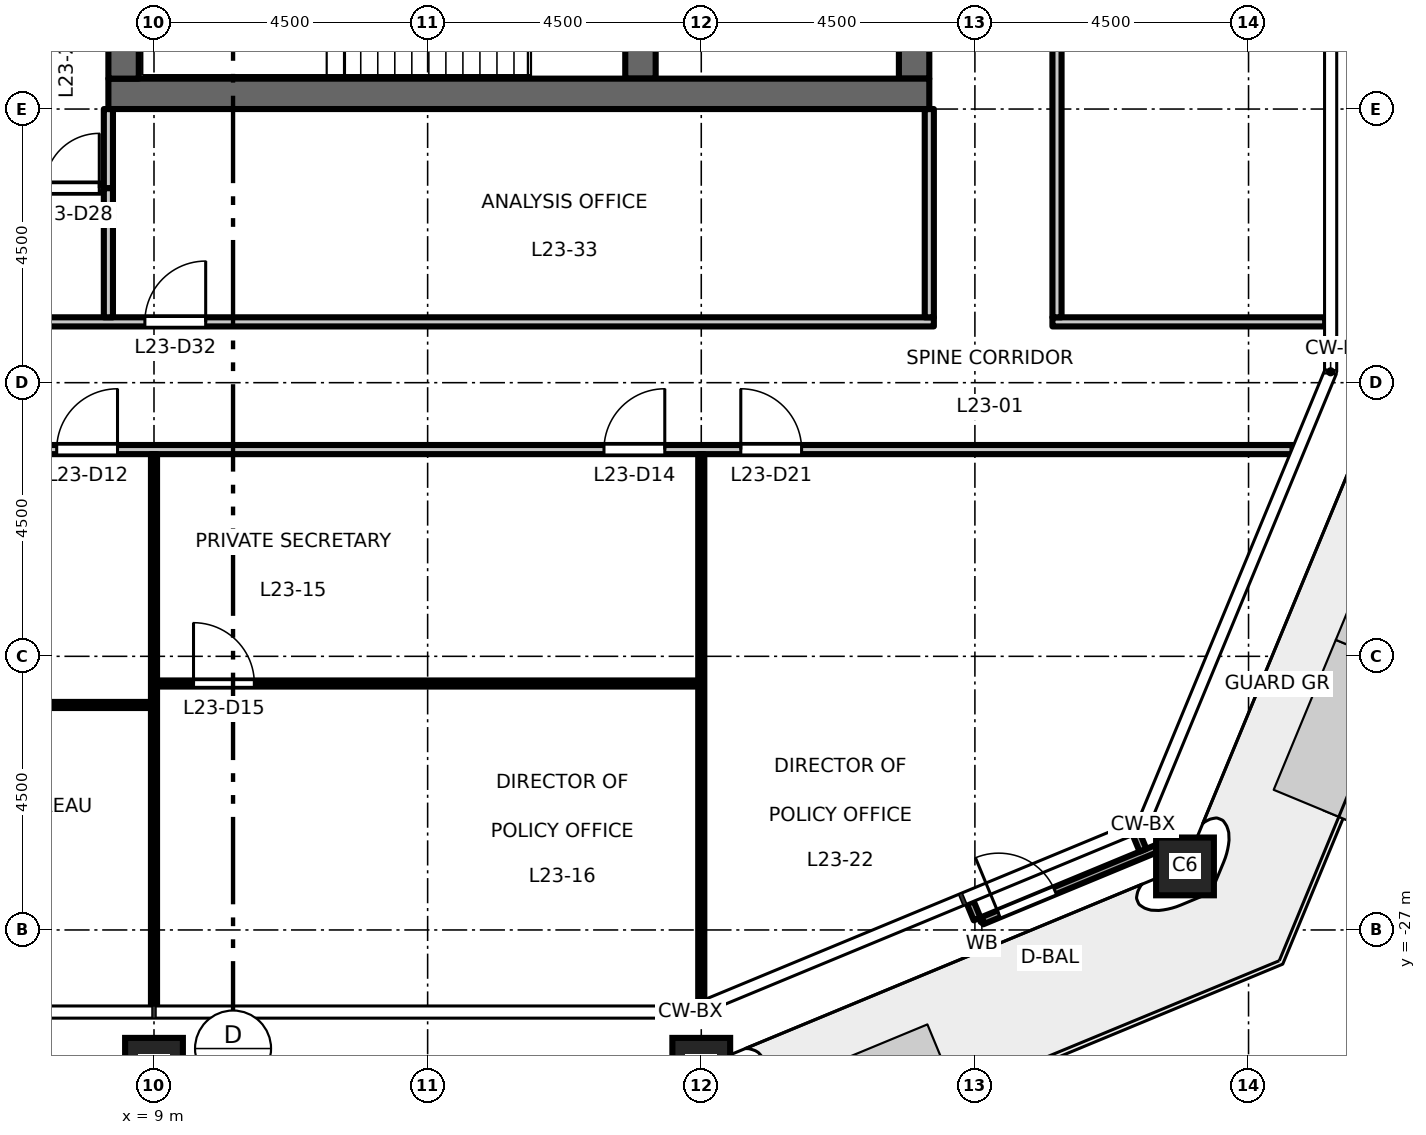
"""IFC4 building model, lengths in metres.
Left out: names, types, materials, properties, quantities, classifications, styles, units other than length and angle.
Written with IfcOpenShell. Run it as: python <this file> out.ifc"""

import sys

from ifc_helpers import new_model, si_unit, direction, frame, frame_2d, origin, origin_2d, place, context, subcontext, project, spatial, rectangle, hollow_rectangle, extrude, element, fill, save


model = new_model("IFC4")
c1 = context("Model", 3, precision=1e-05, world=origin(), true_north=direction((0.0, 1.0)))
c2 = subcontext(c1, "Body", "Model", "MODEL_VIEW")
j1 = project(units=[si_unit("LENGTHUNIT", "METRE"), si_unit("PLANEANGLEUNIT", "RADIAN")], contexts=[c1])
p1 = place(None, origin())
s1 = spatial("IfcSite", under=j1, at=p1, CompositionType="ELEMENT")
p2 = place(p1, origin())
s2 = spatial("IfcBuilding", under=s1, at=p2, CompositionType="ELEMENT")
p3 = place(p2, frame((0.0, 0.0, 109.2)))
s3 = spatial("IfcBuildingStorey", under=s2, at=p3, CompositionType="ELEMENT", Elevation=109.2)
for number, where, z_axis, x_axis in (
    (1, (9.0, -29.25, 0.0), (0.0, 0.0, 1.0), (1.0, 0.0, 0.0)),
    (2, (18.0, -29.25, 0.0), (0.0, 0.0, 1.0), (1.0, 0.0, 0.0)),
    (3, (25.955, -25.955, 0.0), (0.0, 0.0, 1.0), (1.0, 0.0, 0.0)),
):
    element("IfcColumn", number, at=place(p3, frame(where, z_axis=z_axis, x_axis=x_axis)), inside=s3, PredefinedType="COLUMN", context=c2, shape_type="SweptSolid", body=[
        extrude(hollow_rectangle(XDim=0.95, YDim=0.95, WallThickness=0.055, at=origin_2d()), origin(), (0.0, 0.0, 1.0), 4.5),
    ])
p4 = place(p3, frame((21.5, -13.0, 0.0), z_axis=(0.0, 0.0, 1.0), x_axis=(0.0, 1.0, 0.0)))
e4 = element("IfcWall", 4, at=p4, inside=s3, PredefinedType="SHEAR", context=c2, shape_type="SweptSolid", body=[
    extrude(rectangle(XDim=26.0, YDim=0.5, at=frame_2d((13.0, 0.0))), origin(), (0.0, 0.0, 1.0), 4.35),
])
p5 = place(p4, frame((16.825, 0.0, 0.0)))
e5 = element("IfcOpeningElement", 5, at=p5, cuts=e4, PredefinedType="OPENING", context=c2, shape_type="SweptSolid", body=[
    extrude(rectangle(XDim=1.8, YDim=2.1, at=frame_2d((0.9, 1.05))), frame((0.0, 0.26, 0.0), z_axis=(0.0, -1.0, 0.0), x_axis=(1.0, 0.0, 0.0)), (0.0, 0.0, 1.0), 0.52),
])
p6 = place(p4, frame((7.375, 0.0, 0.0)))
e6 = element("IfcOpeningElement", 6, at=p6, cuts=e4, PredefinedType="OPENING", context=c2, shape_type="SweptSolid", body=[
    extrude(rectangle(XDim=1.8, YDim=2.1, at=frame_2d((0.9, 1.05))), frame((0.0, 0.26, 0.0), z_axis=(0.0, -1.0, 0.0), x_axis=(1.0, 0.0, 0.0)), (0.0, 0.0, 1.0), 0.52),
])
p7 = place(p4, frame((23.4, 0.0, 0.0)))
e7 = element("IfcOpeningElement", 7, at=p7, cuts=e4, PredefinedType="OPENING", context=c2, shape_type="SweptSolid", body=[
    extrude(rectangle(XDim=0.9, YDim=2.1, at=frame_2d((0.45, 1.05))), frame((0.0, 0.26, 0.0), z_axis=(0.0, -1.0, 0.0), x_axis=(1.0, 0.0, 0.0)), (0.0, 0.0, 1.0), 0.52),
])
p8 = place(p3, frame((17.0, -13.0, 0.0), z_axis=(0.0, 0.0, 1.0), x_axis=(0.0, 1.0, 0.0)))
e8 = element("IfcWall", 8, at=p8, inside=s3, PredefinedType="SHEAR", context=c2, shape_type="SweptSolid", body=[
    extrude(rectangle(XDim=6.575, YDim=0.5, at=frame_2d((3.288, 0.0))), origin(), (0.0, 0.0, 1.0), 4.35),
])
p9 = place(p3, frame((8.25, -13.25, 0.0), z_axis=(0.0, 0.0, 1.0), x_axis=(1.0, 0.0, 0.0)))
e9 = element("IfcWall", 9, at=p9, inside=s3, PredefinedType="SHEAR", context=c2, shape_type="SweptSolid", body=[
    extrude(rectangle(XDim=13.5, YDim=0.5, at=frame_2d((6.75, 0.0))), origin(), (0.0, 0.0, 1.0), 4.35),
])
p10 = place(p3, frame((8.5, -13.0, 0.0), z_axis=(0.0, 0.0, 1.0), x_axis=(0.0, 1.0, 0.0)))
e10 = element("IfcWall", 10, at=p10, inside=s3, PredefinedType="SHEAR", context=c2, shape_type="SweptSolid", body=[
    extrude(rectangle(XDim=26.0, YDim=0.5, at=frame_2d((13.0, 0.0))), origin(), (0.0, 0.0, 1.0), 4.35),
])
for number, where, z_axis, x_axis in (
    (11, (22.425, -26.551, 0.0), (0.0, 0.0, 1.0), (0.382, -0.924, 0.0)),
    (12, (25.153, -25.421, 0.0), (0.0, 0.0, 1.0), (0.383, -0.924, 0.0)),
):
    element("IfcWall", number, at=place(p3, frame(where, z_axis=z_axis, x_axis=x_axis)), inside=s3, PredefinedType="STANDARD", context=c2, shape_type="SweptSolid", body=[
        extrude(rectangle(XDim=0.29, YDim=0.12, at=frame_2d((0.145, 0.0))), origin(), (0.0, 0.0, 1.0), 4.35),
    ])
p11 = place(p3, frame((22.615, -26.852, 0.0), z_axis=(0.0, 0.0, 1.0), x_axis=(0.923869084389, 0.382708655389, 0.0)))
e13 = element("IfcWall", 13, at=p11, inside=s3, PredefinedType="STANDARD", context=c2, shape_type="SweptSolid", body=[
    extrude(rectangle(XDim=3.102, YDim=0.12, at=frame_2d((1.551, 0.0))), origin(), (0.0, 0.0, 1.0), 4.35),
])
p12 = place(p11, frame((0.3, 0.0, 0.0)))
e14 = element("IfcOpeningElement", 14, at=p12, cuts=e13, PredefinedType="OPENING", context=c2, shape_type="SweptSolid", body=[
    extrude(rectangle(XDim=1.0, YDim=2.4, at=frame_2d((0.5, 1.2))), frame((0.0, 0.07, 0.0), z_axis=(0.0, -1.0, 0.0), x_axis=(1.0, 0.0, 0.0)), (0.0, 0.0, 1.0), 0.14),
])
p13 = place(p3, frame((0.05, -23.3, 0.0), z_axis=(0.0, 0.0, 1.0), x_axis=(1.0, 0.0, 0.0)))
e15 = element("IfcWall", 15, at=p13, inside=s3, PredefinedType="PARTITIONING", context=c2, shape_type="SweptSolid", body=[
    extrude(rectangle(XDim=8.9, YDim=0.1, at=frame_2d((4.45, 0.0))), origin(), (0.0, 0.0, 1.0), 4.35),
])
p14 = place(p13, frame((0.6, 0.0, 0.0)))
e16 = element("IfcOpeningElement", 16, at=p14, cuts=e15, PredefinedType="OPENING", context=c2, shape_type="SweptSolid", body=[
    extrude(rectangle(XDim=1.0, YDim=2.1, at=frame_2d((0.5, 1.05))), frame((0.0, 0.06, 0.0), z_axis=(0.0, -1.0, 0.0), x_axis=(1.0, 0.0, 0.0)), (0.0, 0.0, 1.0), 0.12),
])
p15 = place(p3, frame((9.05, -22.947, 0.0), z_axis=(0.0, 0.0, 1.0), x_axis=(1.0, 0.0, 0.0)))
e17 = element("IfcWall", 17, at=p15, inside=s3, PredefinedType="PARTITIONING", context=c2, shape_type="SweptSolid", body=[
    extrude(rectangle(XDim=8.9, YDim=0.1, at=frame_2d((4.45, 0.0))), origin(), (0.0, 0.0, 1.0), 4.35),
])
p16 = place(p15, frame((0.6, 0.0, 0.0)))
e18 = element("IfcOpeningElement", 18, at=p16, cuts=e17, PredefinedType="OPENING", context=c2, shape_type="SweptSolid", body=[
    extrude(rectangle(XDim=1.0, YDim=2.1, at=frame_2d((0.5, 1.05))), frame((0.0, 0.06, 0.0), z_axis=(0.0, -1.0, 0.0), x_axis=(1.0, 0.0, 0.0)), (0.0, 0.0, 1.0), 0.12),
])
p17 = place(p3, frame((-27.723, -19.1, 0.0), z_axis=(0.0, 0.0, 1.0), x_axis=(1.0, 0.0, 0.0)))
e19 = element("IfcWall", 19, at=p17, inside=s3, PredefinedType="PARTITIONING", context=c2, shape_type="SweptSolid", body=[
    extrude(rectangle(XDim=55.446, YDim=0.15, at=frame_2d((27.723, 0.0))), origin(), (0.0, 0.0, 1.0), 4.35),
])
p18 = place(p17, frame((10.373, 0.0, 0.0)))
e20 = element("IfcOpeningElement", 20, at=p18, cuts=e19, PredefinedType="OPENING", context=c2, shape_type="SweptSolid", body=[
    extrude(rectangle(XDim=1.0, YDim=2.1, at=frame_2d((0.5, 1.05))), frame((0.0, 0.085, 0.0), z_axis=(0.0, -1.0, 0.0), x_axis=(1.0, 0.0, 0.0)), (0.0, 0.0, 1.0), 0.17),
])
p19 = place(p17, frame((19.373, 0.0, 0.0)))
e21 = element("IfcOpeningElement", 21, at=p19, cuts=e19, PredefinedType="OPENING", context=c2, shape_type="SweptSolid", body=[
    extrude(rectangle(XDim=1.0, YDim=2.1, at=frame_2d((0.5, 1.05))), frame((0.0, 0.085, 0.0), z_axis=(0.0, -1.0, 0.0), x_axis=(1.0, 0.0, 0.0)), (0.0, 0.0, 1.0), 0.17),
])
p20 = place(p17, frame((35.123, 0.0, 0.0)))
e22 = element("IfcOpeningElement", 22, at=p20, cuts=e19, PredefinedType="OPENING", context=c2, shape_type="SweptSolid", body=[
    extrude(rectangle(XDim=1.0, YDim=2.1, at=frame_2d((0.5, 1.05))), frame((0.0, 0.085, 0.0), z_axis=(0.0, -1.0, 0.0), x_axis=(1.0, 0.0, 0.0)), (0.0, 0.0, 1.0), 0.17),
])
p21 = place(p17, frame((44.123, 0.0, 0.0)))
e23 = element("IfcOpeningElement", 23, at=p21, cuts=e19, PredefinedType="OPENING", context=c2, shape_type="SweptSolid", body=[
    extrude(rectangle(XDim=1.0, YDim=2.1, at=frame_2d((0.5, 1.05))), frame((0.0, 0.085, 0.0), z_axis=(0.0, -1.0, 0.0), x_axis=(1.0, 0.0, 0.0)), (0.0, 0.0, 1.0), 0.17),
])
p22 = place(p17, frame((0.65, 0.0, 0.0)))
e24 = element("IfcOpeningElement", 24, at=p22, cuts=e19, PredefinedType="OPENING", context=c2, shape_type="SweptSolid", body=[
    extrude(rectangle(XDim=1.0, YDim=2.1, at=frame_2d((0.5, 1.05))), frame((0.0, 0.085, 0.0), z_axis=(0.0, -1.0, 0.0), x_axis=(1.0, 0.0, 0.0)), (0.0, 0.0, 1.0), 0.17),
])
p23 = place(p17, frame((46.373, 0.0, 0.0)))
e25 = element("IfcOpeningElement", 25, at=p23, cuts=e19, PredefinedType="OPENING", context=c2, shape_type="SweptSolid", body=[
    extrude(rectangle(XDim=1.0, YDim=2.1, at=frame_2d((0.5, 1.05))), frame((0.0, 0.085, 0.0), z_axis=(0.0, -1.0, 0.0), x_axis=(1.0, 0.0, 0.0)), (0.0, 0.0, 1.0), 0.17),
])
p24 = place(p3, frame((-21.825, -17.0, 0.0), z_axis=(0.0, 0.0, 1.0), x_axis=(1.0, 0.0, 0.0)))
e26 = element("IfcWall", 26, at=p24, inside=s3, PredefinedType="PARTITIONING", context=c2, shape_type="SweptSolid", body=[
    extrude(rectangle(XDim=43.65, YDim=0.15, at=frame_2d((21.825, 0.0))), origin(), (0.0, 0.0, 1.0), 4.35),
])
p25 = place(p24, frame((14.175, 0.0, 0.0)))
e27 = element("IfcOpeningElement", 27, at=p25, cuts=e26, PredefinedType="OPENING", context=c2, shape_type="SweptSolid", body=[
    extrude(rectangle(XDim=1.0, YDim=2.1, at=frame_2d((0.5, 1.05))), frame((0.0, 0.085, 0.0), z_axis=(0.0, -1.0, 0.0), x_axis=(1.0, 0.0, 0.0)), (0.0, 0.0, 1.0), 0.17),
])
p26 = place(p24, frame((11.925, 0.0, 0.0)))
e28 = element("IfcOpeningElement", 28, at=p26, cuts=e26, PredefinedType="OPENING", context=c2, shape_type="SweptSolid", body=[
    extrude(rectangle(XDim=1.0, YDim=2.1, at=frame_2d((0.5, 1.05))), frame((0.0, 0.085, 0.0), z_axis=(0.0, -1.0, 0.0), x_axis=(1.0, 0.0, 0.0)), (0.0, 0.0, 1.0), 0.17),
])
p27 = place(p24, frame((30.675, 0.0, 0.0)))
e29 = element("IfcOpeningElement", 29, at=p27, cuts=e26, PredefinedType="OPENING", context=c2, shape_type="SweptSolid", body=[
    extrude(rectangle(XDim=1.0, YDim=2.1, at=frame_2d((0.5, 1.05))), frame((0.0, 0.085, 0.0), z_axis=(0.0, -1.0, 0.0), x_axis=(1.0, 0.0, 0.0)), (0.0, 0.0, 1.0), 0.17),
])
p28 = place(p3, frame((23.775, -17.0, 0.0), z_axis=(0.0, 0.0, 1.0), x_axis=(1.0, 0.0, 0.0)))
e30 = element("IfcWall", 30, at=p28, inside=s3, PredefinedType="PARTITIONING", context=c2, shape_type="SweptSolid", body=[
    extrude(rectangle(XDim=4.485, YDim=0.15, at=frame_2d((2.243, 0.0))), origin(), (0.0, 0.0, 1.0), 4.35),
])
p29 = place(p3, frame((6.92, -14.8, 0.0), z_axis=(0.0, 0.0, 1.0), x_axis=(1.0, 0.0, 0.0)))
e31 = element("IfcWall", 31, at=p29, inside=s3, PredefinedType="PARTITIONING", context=c2, shape_type="SweptSolid", body=[
    extrude(rectangle(XDim=1.255, YDim=0.15, at=frame_2d((0.627, 0.0))), origin(), (0.0, 0.0, 1.0), 4.35),
])
p30 = place(p29, frame((0.28, 0.0, 0.0)))
e32 = element("IfcOpeningElement", 32, at=p30, cuts=e31, PredefinedType="OPENING", context=c2, shape_type="SweptSolid", body=[
    extrude(rectangle(XDim=0.9, YDim=2.1, at=frame_2d((0.45, 1.05))), frame((0.0, 0.085, 0.0), z_axis=(0.0, -1.0, 0.0), x_axis=(1.0, 0.0, 0.0)), (0.0, 0.0, 1.0), 0.17),
])
p31 = place(p3, frame((8.25, -16.925, 0.0), z_axis=(0.0, 0.0, 1.0), x_axis=(0.0, 1.0, 0.0)))
e33 = element("IfcWall", 33, at=p31, inside=s3, PredefinedType="PARTITIONING", context=c2, shape_type="SweptSolid", body=[
    extrude(rectangle(XDim=2.125, YDim=0.15, at=frame_2d((1.062, 0.0))), origin(), (0.0, 0.0, 1.0), 4.35),
])
p32 = place(p3, frame((8.25, -14.8, 0.0), z_axis=(0.0, 0.0, 1.0), x_axis=(0.0, 1.0, 0.0)))
e34 = element("IfcWall", 34, at=p32, inside=s3, PredefinedType="PARTITIONING", context=c2, shape_type="SweptSolid", body=[
    extrude(rectangle(XDim=1.3, YDim=0.15, at=frame_2d((0.65, 0.0))), origin(), (0.0, 0.0, 1.0), 4.35),
])
p33 = place(p3, frame((9.0, -28.26, 0.0), z_axis=(0.0, 0.0, 1.0), x_axis=(0.0, 1.0, 0.0)))
e35 = element("IfcWall", 35, at=p33, inside=s3, PredefinedType="PARTITIONING", context=c2, shape_type="SweptSolid", body=[
    extrude(rectangle(XDim=9.085, YDim=0.1, at=frame_2d((4.542, 0.0))), origin(), (0.0, 0.0, 1.0), 3.45),
])
p34 = place(p3, frame((18.0, -28.178, 0.0), z_axis=(0.0, 0.0, 1.0), x_axis=(0.0, 1.0, 0.0)))
e36 = element("IfcWall", 36, at=p34, inside=s3, PredefinedType="PARTITIONING", context=c2, shape_type="SweptSolid", body=[
    extrude(rectangle(XDim=9.003, YDim=0.1, at=frame_2d((4.501, 0.0))), origin(), (0.0, 0.0, 1.0), 3.45),
])
p35 = place(p3, frame((21.75, -16.925, 0.0), z_axis=(0.0, 0.0, 1.0), x_axis=(0.0, 1.0, 0.0)))
e37 = element("IfcWall", 37, at=p35, inside=s3, PredefinedType="PARTITIONING", context=c2, shape_type="SweptSolid", body=[
    extrude(rectangle(XDim=3.425, YDim=0.15, at=frame_2d((1.712, 0.0))), origin(), (0.0, 0.0, 1.0), 4.35),
])
p36 = place(p3, frame((23.85, -16.925, 0.0), z_axis=(0.0, 0.0, 1.0), x_axis=(0.0, 1.0, 0.0)))
e38 = element("IfcWall", 38, at=p36, inside=s3, PredefinedType="PARTITIONING", context=c2, shape_type="SweptSolid", body=[
    extrude(rectangle(XDim=33.85, YDim=0.15, at=frame_2d((16.925, 0.0))), origin(), (0.0, 0.0, 1.0), 4.35),
])
p37 = place(p36, frame((32.325, 0.0, 0.0)))
e39 = element("IfcOpeningElement", 39, at=p37, cuts=e38, PredefinedType="OPENING", context=c2, shape_type="SweptSolid", body=[
    extrude(rectangle(XDim=1.0, YDim=2.1, at=frame_2d((0.5, 1.05))), frame((0.0, 0.085, 0.0), z_axis=(0.0, -1.0, 0.0), x_axis=(1.0, 0.0, 0.0)), (0.0, 0.0, 1.0), 0.17),
])
p38 = place(p12, origin())
e40 = element("IfcDoor", 40, at=p38, inside=s3, OperationType="SINGLE_SWING_LEFT", PredefinedType="DOOR", context=c2, shape_type="SweptSolid", body=[
    extrude(rectangle(XDim=1.0, YDim=2.4, at=frame_2d((0.5, 1.2))), frame((0.0, 0.025, 0.0), z_axis=(0.0, -1.0, 0.0), x_axis=(1.0, 0.0, 0.0)), (0.0, 0.0, 1.0), 0.05),
])
fill(e14, e40)
p39 = place(p20, origin())
e41 = element("IfcDoor", 41, at=p39, inside=s3, OperationType="SINGLE_SWING_RIGHT", PredefinedType="DOOR", context=c2, shape_type="SweptSolid", body=[
    extrude(rectangle(XDim=1.0, YDim=2.1, at=frame_2d((0.5, 1.05))), frame((0.0, 0.025, 0.0), z_axis=(0.0, -1.0, 0.0), x_axis=(1.0, 0.0, 0.0)), (0.0, 0.0, 1.0), 0.05),
])
fill(e22, e41)
p40 = place(p21, origin())
e42 = element("IfcDoor", 42, at=p40, inside=s3, OperationType="SINGLE_SWING_RIGHT", PredefinedType="DOOR", context=c2, shape_type="SweptSolid", body=[
    extrude(rectangle(XDim=1.0, YDim=2.1, at=frame_2d((0.5, 1.05))), frame((0.0, 0.025, 0.0), z_axis=(0.0, -1.0, 0.0), x_axis=(1.0, 0.0, 0.0)), (0.0, 0.0, 1.0), 0.05),
])
fill(e23, e42)
p41 = place(p16, origin())
e43 = element("IfcDoor", 43, at=p41, inside=s3, OperationType="SINGLE_SWING_LEFT", PredefinedType="DOOR", context=c2, shape_type="SweptSolid", body=[
    extrude(rectangle(XDim=1.0, YDim=2.1, at=frame_2d((0.5, 1.05))), frame((0.0, 0.025, 0.0), z_axis=(0.0, -1.0, 0.0), x_axis=(1.0, 0.0, 0.0)), (0.0, 0.0, 1.0), 0.05),
])
fill(e18, e43)
p42 = place(p23, origin())
e44 = element("IfcDoor", 44, at=p42, inside=s3, OperationType="SINGLE_SWING_LEFT", PredefinedType="DOOR", context=c2, shape_type="SweptSolid", body=[
    extrude(rectangle(XDim=1.0, YDim=2.1, at=frame_2d((0.5, 1.05))), frame((0.0, 0.025, 0.0), z_axis=(0.0, -1.0, 0.0), x_axis=(1.0, 0.0, 0.0)), (0.0, 0.0, 1.0), 0.05),
])
fill(e25, e44)
p43 = place(p30, origin())
e45 = element("IfcDoor", 45, at=p43, inside=s3, OperationType="SINGLE_SWING_RIGHT", PredefinedType="DOOR", context=c2, shape_type="SweptSolid", body=[
    extrude(rectangle(XDim=0.9, YDim=2.1, at=frame_2d((0.45, 1.05))), frame((0.0, 0.025, 0.0), z_axis=(0.0, -1.0, 0.0), x_axis=(1.0, 0.0, 0.0)), (0.0, 0.0, 1.0), 0.05),
])
fill(e32, e45)
p44 = place(p27, origin())
e46 = element("IfcDoor", 46, at=p44, inside=s3, OperationType="SINGLE_SWING_RIGHT", PredefinedType="DOOR", context=c2, shape_type="SweptSolid", body=[
    extrude(rectangle(XDim=1.0, YDim=2.1, at=frame_2d((0.5, 1.05))), frame((0.0, 0.025, 0.0), z_axis=(0.0, -1.0, 0.0), x_axis=(1.0, 0.0, 0.0)), (0.0, 0.0, 1.0), 0.05),
])
fill(e29, e46)
save(model, sys.argv[1])
